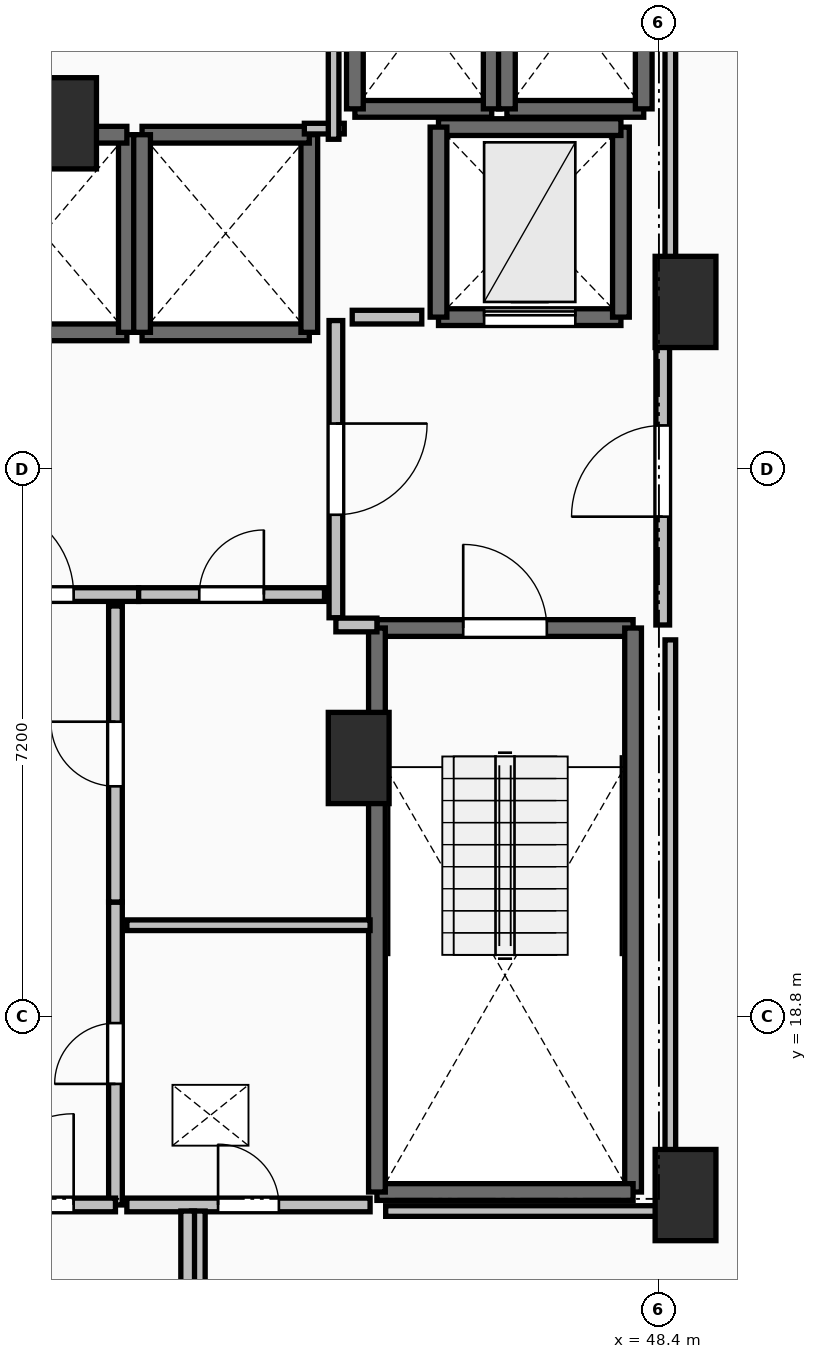
"""IFC4 building model, lengths in metres.
Left out: names, types, materials, properties, quantities, classifications, styles, units other than length and angle.
Written with IfcOpenShell. Run it as: python <this file> out.ifc"""

import sys

from ifc_helpers import new_model, si_unit, direction, frame, frame_2d, origin, origin_2d, place, context, subcontext, project, spatial, rectangle, extrude, element, fill, save


model = new_model("IFC4")
c1 = context("Model", 3, precision=1e-05, world=origin(), true_north=direction((0.0, 1.0)))
c2 = subcontext(c1, "Body", "Model", "MODEL_VIEW")
j1 = project(units=[si_unit("LENGTHUNIT", "METRE"), si_unit("PLANEANGLEUNIT", "RADIAN")], contexts=[c1])
p1 = place(None, origin())
s1 = spatial("IfcSite", under=j1, at=p1, CompositionType="ELEMENT")
p2 = place(p1, origin())
s2 = spatial("IfcBuilding", under=s1, at=p2, CompositionType="ELEMENT")
p3 = place(p2, frame((0.0, 0.0, 78.8)))
s3 = spatial("IfcBuildingStorey", under=s2, at=p3, CompositionType="ELEMENT", Elevation=78.8)
for number, where, z_axis, x_axis in (
    (1, (48.75, 28.2, 0.0), (0.0, 0.0, 1.0), (1.0, 0.0, 0.0)),
    (2, (48.75, 16.45, 0.0), (0.0, 0.0, 1.0), (1.0, 0.0, 0.0)),
    (3, (44.45, 22.2, 0.0), (0.0, 0.0, 1.0), (1.0, 0.0, 0.0)),
    (4, (40.6, 30.55, 0.0), (0.0, 0.0, 1.0), (1.0, 0.0, 0.0)),
):
    element("IfcColumn", number, at=place(p3, frame(where, z_axis=z_axis, x_axis=x_axis)), inside=s3, PredefinedType="PILASTER", context=c2, shape_type="SweptSolid", body=[
        extrude(rectangle(XDim=0.8, YDim=1.2, at=origin_2d()), origin(), (0.0, 0.0, 1.0), 3.5),
    ])
p4 = place(p3, frame((44.69, 23.91, 0.0), z_axis=(0.0, 0.0, 1.0), x_axis=(1.0, 0.0, 0.0)))
e5 = element("IfcWall", 5, at=p4, inside=s3, PredefinedType="SOLIDWALL", context=c2, shape_type="SweptSolid", body=[
    extrude(rectangle(XDim=3.37, YDim=0.22, at=frame_2d((1.685, 0.0))), origin(), (0.0, 0.0, 1.0), 3.24),
])
p5 = place(p4, frame((1.135, 0.0, 0.0)))
e6 = element("IfcOpeningElement", 6, at=p5, cuts=e5, PredefinedType="OPENING", context=c2, shape_type="SweptSolid", body=[
    extrude(rectangle(XDim=1.1, YDim=2.15, at=frame_2d((0.55, 1.075))), frame((0.0, 0.125, 0.0), z_axis=(0.0, -1.0, 0.0), x_axis=(1.0, 0.0, 0.0)), (0.0, 0.0, 1.0), 0.25),
])
p6 = place(p3, frame((48.06, 23.91, 0.0), z_axis=(0.0, 0.0, 1.0), x_axis=(0.0, -1.0, 0.0)))
e7 = element("IfcWall", 7, at=p6, inside=s3, PredefinedType="SOLIDWALL", context=c2, shape_type="SweptSolid", body=[
    extrude(rectangle(XDim=7.42, YDim=0.22, at=frame_2d((3.71, 0.0))), origin(), (0.0, 0.0, 1.0), 3.24),
])
p7 = place(p3, frame((48.06, 16.49, 0.0), z_axis=(0.0, 0.0, 1.0), x_axis=(-1.0, 0.0, 0.0)))
e8 = element("IfcWall", 8, at=p7, inside=s3, PredefinedType="SOLIDWALL", context=c2, shape_type="SweptSolid", body=[
    extrude(rectangle(XDim=3.37, YDim=0.22, at=frame_2d((1.685, 0.0))), origin(), (0.0, 0.0, 1.0), 3.24),
])
p8 = place(p3, frame((44.69, 16.49, 0.0), z_axis=(0.0, 0.0, 1.0), x_axis=(0.0, 1.0, 0.0)))
e9 = element("IfcWall", 9, at=p8, inside=s3, PredefinedType="SOLIDWALL", context=c2, shape_type="SweptSolid", body=[
    extrude(rectangle(XDim=7.42, YDim=0.22, at=frame_2d((3.71, 0.0))), origin(), (0.0, 0.0, 1.0), 3.24),
])
p9 = place(p3, frame((39.2, 27.8, 0.0), z_axis=(0.0, 0.0, 1.0), x_axis=(1.0, 0.0, 0.0)))
e10 = element("IfcWall", 10, at=p9, inside=s3, PredefinedType="SOLIDWALL", context=c2, shape_type="SweptSolid", body=[
    extrude(rectangle(XDim=2.2, YDim=0.22, at=frame_2d((1.1, 0.0))), origin(), (0.0, 0.0, 1.0), 3.24),
])
p10 = place(p3, frame((41.4, 27.8, 0.0), z_axis=(0.0, 0.0, 1.0), x_axis=(0.0, 1.0, 0.0)))
e11 = element("IfcWall", 11, at=p10, inside=s3, PredefinedType="SOLIDWALL", context=c2, shape_type="SweptSolid", body=[
    extrude(rectangle(XDim=2.6, YDim=0.22, at=frame_2d((1.3, 0.0))), origin(), (0.0, 0.0, 1.0), 3.24),
])
for number, where, z_axis, x_axis in (
    (12, (41.4, 30.4, 0.0), (0.0, 0.0, 1.0), (-1.0, 0.0, 0.0)),
    (13, (41.6, 27.8, 0.0), (0.0, 0.0, 1.0), (1.0, 0.0, 0.0)),
):
    element("IfcWall", number, at=place(p3, frame(where, z_axis=z_axis, x_axis=x_axis)), inside=s3, PredefinedType="SOLIDWALL", context=c2, shape_type="SweptSolid", body=[
        extrude(rectangle(XDim=2.2, YDim=0.22, at=frame_2d((1.1, 0.0))), origin(), (0.0, 0.0, 1.0), 3.24),
    ])
p11 = place(p3, frame((43.8, 27.8, 0.0), z_axis=(0.0, 0.0, 1.0), x_axis=(0.0, 1.0, 0.0)))
e14 = element("IfcWall", 14, at=p11, inside=s3, PredefinedType="SOLIDWALL", context=c2, shape_type="SweptSolid", body=[
    extrude(rectangle(XDim=2.6, YDim=0.22, at=frame_2d((1.3, 0.0))), origin(), (0.0, 0.0, 1.0), 3.24),
])
p12 = place(p3, frame((43.8, 30.4, 0.0), z_axis=(0.0, 0.0, 1.0), x_axis=(-1.0, 0.0, 0.0)))
e15 = element("IfcWall", 15, at=p12, inside=s3, PredefinedType="SOLIDWALL", context=c2, shape_type="SweptSolid", body=[
    extrude(rectangle(XDim=2.2, YDim=0.22, at=frame_2d((1.1, 0.0))), origin(), (0.0, 0.0, 1.0), 3.24),
])
p13 = place(p3, frame((41.6, 30.4, 0.0), z_axis=(0.0, 0.0, 1.0), x_axis=(0.0, -1.0, 0.0)))
e16 = element("IfcWall", 16, at=p13, inside=s3, PredefinedType="SOLIDWALL", context=c2, shape_type="SweptSolid", body=[
    extrude(rectangle(XDim=2.6, YDim=0.22, at=frame_2d((1.3, 0.0))), origin(), (0.0, 0.0, 1.0), 3.24),
])
p14 = place(p3, frame((44.4, 30.74, 0.0), z_axis=(0.0, 0.0, 1.0), x_axis=(1.0, 0.0, 0.0)))
e17 = element("IfcWall", 17, at=p14, inside=s3, PredefinedType="SOLIDWALL", context=c2, shape_type="SweptSolid", body=[
    extrude(rectangle(XDim=1.8, YDim=0.22, at=frame_2d((0.9, 0.0))), origin(), (0.0, 0.0, 1.0), 3.24),
])
for number, where, z_axis, x_axis in (
    (18, (46.2, 30.74, 0.0), (0.0, 0.0, 1.0), (0.0, 1.0, 0.0)),
    (19, (44.4, 33.16, 0.0), (0.0, 0.0, 1.0), (0.0, -1.0, 0.0)),
):
    element("IfcWall", number, at=place(p3, frame(where, z_axis=z_axis, x_axis=x_axis)), inside=s3, PredefinedType="SOLIDWALL", context=c2, shape_type="SweptSolid", body=[
        extrude(rectangle(XDim=2.42, YDim=0.22, at=frame_2d((1.21, 0.0))), origin(), (0.0, 0.0, 1.0), 3.24),
    ])
p15 = place(p3, frame((46.4, 30.74, 0.0), z_axis=(0.0, 0.0, 1.0), x_axis=(1.0, 0.0, 0.0)))
e20 = element("IfcWall", 20, at=p15, inside=s3, PredefinedType="SOLIDWALL", context=c2, shape_type="SweptSolid", body=[
    extrude(rectangle(XDim=1.8, YDim=0.22, at=frame_2d((0.9, 0.0))), origin(), (0.0, 0.0, 1.0), 3.24),
])
for number, where, z_axis, x_axis in (
    (21, (48.2, 30.74, 0.0), (0.0, 0.0, 1.0), (0.0, 1.0, 0.0)),
    (22, (46.4, 33.16, 0.0), (0.0, 0.0, 1.0), (0.0, -1.0, 0.0)),
):
    element("IfcWall", number, at=place(p3, frame(where, z_axis=z_axis, x_axis=x_axis)), inside=s3, PredefinedType="SOLIDWALL", context=c2, shape_type="SweptSolid", body=[
        extrude(rectangle(XDim=2.42, YDim=0.22, at=frame_2d((1.21, 0.0))), origin(), (0.0, 0.0, 1.0), 3.24),
    ])
p16 = place(p3, frame((45.5, 28.0, 0.0), z_axis=(0.0, 0.0, 1.0), x_axis=(1.0, 0.0, 0.0)))
e23 = element("IfcWall", 23, at=p16, inside=s3, PredefinedType="SHEAR", context=c2, shape_type="SweptSolid", body=[
    extrude(rectangle(XDim=2.4, YDim=0.22, at=frame_2d((1.2, 0.0))), origin(), (0.0, 0.0, 1.0), 3.24),
])
p17 = place(p16, frame((0.6, 0.0, 0.0)))
e24 = element("IfcOpeningElement", 24, at=p17, cuts=e23, PredefinedType="OPENING", context=c2, shape_type="SweptSolid", body=[
    extrude(rectangle(XDim=1.2, YDim=2.2, at=frame_2d((0.6, 1.1))), frame((0.0, 0.125, 0.0), z_axis=(0.0, -1.0, 0.0), x_axis=(1.0, 0.0, 0.0)), (0.0, 0.0, 1.0), 0.25),
])
p18 = place(p3, frame((47.9, 28.0, 0.0), z_axis=(0.0, 0.0, 1.0), x_axis=(0.0, 1.0, 0.0)))
e25 = element("IfcWall", 25, at=p18, inside=s3, PredefinedType="SHEAR", context=c2, shape_type="SweptSolid", body=[
    extrude(rectangle(XDim=2.5, YDim=0.22, at=frame_2d((1.25, 0.0))), origin(), (0.0, 0.0, 1.0), 3.24),
])
p19 = place(p3, frame((47.9, 30.5, 0.0), z_axis=(0.0, 0.0, 1.0), x_axis=(-1.0, 0.0, 0.0)))
e26 = element("IfcWall", 26, at=p19, inside=s3, PredefinedType="SHEAR", context=c2, shape_type="SweptSolid", body=[
    extrude(rectangle(XDim=2.4, YDim=0.22, at=frame_2d((1.2, 0.0))), origin(), (0.0, 0.0, 1.0), 3.24),
])
p20 = place(p3, frame((45.5, 30.5, 0.0), z_axis=(0.0, 0.0, 1.0), x_axis=(0.0, -1.0, 0.0)))
e27 = element("IfcWall", 27, at=p20, inside=s3, PredefinedType="SHEAR", context=c2, shape_type="SweptSolid", body=[
    extrude(rectangle(XDim=2.5, YDim=0.22, at=frame_2d((1.25, 0.0))), origin(), (0.0, 0.0, 1.0), 3.24),
])
p21 = place(p3, frame((44.15, 27.955, 0.0), z_axis=(0.0, 0.0, 1.0), x_axis=(0.0, -1.0, 0.0)))
e28 = element("IfcWall", 28, at=p21, inside=s3, PredefinedType="PARTITIONING", context=c2, shape_type="SweptSolid", body=[
    extrude(rectangle(XDim=3.91, YDim=0.18, at=frame_2d((1.955, 0.0))), origin(), (0.0, 0.0, 1.0), 3.24),
])
p22 = place(p21, frame((1.355, 0.0, 0.0)))
e29 = element("IfcOpeningElement", 29, at=p22, cuts=e28, PredefinedType="OPENING", context=c2, shape_type="SweptSolid", body=[
    extrude(rectangle(XDim=1.2, YDim=2.15, at=frame_2d((0.6, 1.075))), frame((0.0, 0.105, 0.0), z_axis=(0.0, -1.0, 0.0), x_axis=(1.0, 0.0, 0.0)), (0.0, 0.0, 1.0), 0.21),
])
p23 = place(p3, frame((44.15, 23.95, 0.0), z_axis=(0.0, 0.0, 1.0), x_axis=(1.0, 0.0, 0.0)))
e30 = element("IfcWall", 30, at=p23, inside=s3, PredefinedType="PARTITIONING", context=c2, shape_type="SweptSolid", body=[
    extrude(rectangle(XDim=0.54, YDim=0.18, at=frame_2d((0.27, 0.0))), origin(), (0.0, 0.0, 1.0), 3.24),
])
p24 = place(p3, frame((48.45, 23.95, 0.0), z_axis=(0.0, 0.0, 1.0), x_axis=(0.0, 1.0, 0.0)))
e31 = element("IfcWall", 31, at=p24, inside=s3, PredefinedType="PARTITIONING", context=c2, shape_type="SweptSolid", body=[
    extrude(rectangle(XDim=4.05, YDim=0.18, at=frame_2d((2.025, 0.0))), origin(), (0.0, 0.0, 1.0), 3.24),
])
p25 = place(p24, frame((1.425, 0.0, 0.0)))
e32 = element("IfcOpeningElement", 32, at=p25, cuts=e31, PredefinedType="OPENING", context=c2, shape_type="SweptSolid", body=[
    extrude(rectangle(XDim=1.2, YDim=2.15, at=frame_2d((0.6, 1.075))), frame((0.0, 0.105, 0.0), z_axis=(0.0, -1.0, 0.0), x_axis=(1.0, 0.0, 0.0)), (0.0, 0.0, 1.0), 0.21),
])
p26 = place(p3, frame((38.645, 24.35, 0.0), z_axis=(0.0, 0.0, 1.0), x_axis=(1.0, 0.0, 0.0)))
e33 = element("IfcWall", 33, at=p26, inside=s3, PredefinedType="PARTITIONING", context=c2, shape_type="SweptSolid", body=[
    extrude(rectangle(XDim=2.91, YDim=0.18, at=frame_2d((1.455, 0.0))), origin(), (0.0, 0.0, 1.0), 3.24),
])
p27 = place(p26, frame((0.855, 0.0, 0.0)))
e34 = element("IfcOpeningElement", 34, at=p27, cuts=e33, PredefinedType="OPENING", context=c2, shape_type="SweptSolid", body=[
    extrude(rectangle(XDim=1.2, YDim=2.15, at=frame_2d((0.6, 1.075))), frame((0.0, 0.105, 0.0), z_axis=(0.0, -1.0, 0.0), x_axis=(1.0, 0.0, 0.0)), (0.0, 0.0, 1.0), 0.21),
])
p28 = place(p3, frame((41.555, 24.35, 0.0), z_axis=(0.0, 0.0, 1.0), x_axis=(1.0, 0.0, 0.0)))
e35 = element("IfcWall", 35, at=p28, inside=s3, PredefinedType="PARTITIONING", context=c2, shape_type="SweptSolid", body=[
    extrude(rectangle(XDim=2.445, YDim=0.18, at=frame_2d((1.223, 0.0))), origin(), (0.0, 0.0, 1.0), 3.24),
])
p29 = place(p28, frame((0.798, 0.0, 0.0)))
e36 = element("IfcOpeningElement", 36, at=p29, cuts=e35, PredefinedType="OPENING", context=c2, shape_type="SweptSolid", body=[
    extrude(rectangle(XDim=0.85, YDim=2.1, at=frame_2d((0.425, 1.05))), frame((0.0, 0.105, 0.0), z_axis=(0.0, -1.0, 0.0), x_axis=(1.0, 0.0, 0.0)), (0.0, 0.0, 1.0), 0.21),
])
p30 = place(p3, frame((41.25, 16.32, 0.0), z_axis=(0.0, 0.0, 1.0), x_axis=(0.0, 1.0, 0.0)))
e37 = element("IfcWall", 37, at=p30, inside=s3, PredefinedType="PARTITIONING", context=c2, shape_type="SweptSolid", body=[
    extrude(rectangle(XDim=3.985, YDim=0.18, at=frame_2d((1.992, 0.0))), origin(), (0.0, 0.0, 1.0), 3.24),
])
p31 = place(p30, frame((1.593, 0.0, 0.0)))
e38 = element("IfcOpeningElement", 38, at=p31, cuts=e37, PredefinedType="OPENING", context=c2, shape_type="SweptSolid", body=[
    extrude(rectangle(XDim=0.8, YDim=2.05, at=frame_2d((0.4, 1.025))), frame((0.0, 0.105, 0.0), z_axis=(0.0, -1.0, 0.0), x_axis=(1.0, 0.0, 0.0)), (0.0, 0.0, 1.0), 0.21),
])
p32 = place(p3, frame((41.25, 20.305, 0.0), z_axis=(0.0, 0.0, 1.0), x_axis=(0.0, 1.0, 0.0)))
e39 = element("IfcWall", 39, at=p32, inside=s3, PredefinedType="PARTITIONING", context=c2, shape_type="SweptSolid", body=[
    extrude(rectangle(XDim=3.895, YDim=0.18, at=frame_2d((1.948, 0.0))), origin(), (0.0, 0.0, 1.0), 3.24),
])
p33 = place(p32, frame((1.522, 0.0, 0.0)))
e40 = element("IfcOpeningElement", 40, at=p33, cuts=e39, PredefinedType="OPENING", context=c2, shape_type="SweptSolid", body=[
    extrude(rectangle(XDim=0.85, YDim=2.1, at=frame_2d((0.425, 1.05))), frame((0.0, 0.105, 0.0), z_axis=(0.0, -1.0, 0.0), x_axis=(1.0, 0.0, 0.0)), (0.0, 0.0, 1.0), 0.21),
])
p34 = place(p3, frame((38.95, 16.32, 0.0), z_axis=(0.0, 0.0, 1.0), x_axis=(1.0, 0.0, 0.0)))
e41 = element("IfcWall", 41, at=p34, inside=s3, PredefinedType="PARTITIONING", context=c2, shape_type="SweptSolid", body=[
    extrude(rectangle(XDim=2.3, YDim=0.18, at=frame_2d((1.15, 0.0))), origin(), (0.0, 0.0, 1.0), 3.24),
])
p35 = place(p34, frame((0.55, 0.0, 0.0)))
e42 = element("IfcOpeningElement", 42, at=p35, cuts=e41, PredefinedType="OPENING", context=c2, shape_type="SweptSolid", body=[
    extrude(rectangle(XDim=1.2, YDim=2.15, at=frame_2d((0.6, 1.075))), frame((0.0, 0.105, 0.0), z_axis=(0.0, -1.0, 0.0), x_axis=(1.0, 0.0, 0.0)), (0.0, 0.0, 1.0), 0.21),
])
p36 = place(p3, frame((44.6, 20.0, 0.0), z_axis=(0.0, 0.0, 1.0), x_axis=(-1.0, 0.0, 0.0)))
e43 = element("IfcWall", 43, at=p36, inside=s3, PredefinedType="PARTITIONING", context=c2, shape_type="SweptSolid", body=[
    extrude(rectangle(XDim=3.2, YDim=0.14, at=frame_2d((1.6, 0.0))), origin(), (0.0, 0.0, 1.0), 3.24),
])
p37 = place(p3, frame((41.4, 16.32, 0.0), z_axis=(0.0, 0.0, 1.0), x_axis=(1.0, 0.0, 0.0)))
e44 = element("IfcWall", 44, at=p37, inside=s3, PredefinedType="PARTITIONING", context=c2, shape_type="SweptSolid", body=[
    extrude(rectangle(XDim=3.2, YDim=0.18, at=frame_2d((1.6, 0.0))), origin(), (0.0, 0.0, 1.0), 3.24),
])
p38 = place(p37, frame((1.2, 0.0, 0.0)))
e45 = element("IfcOpeningElement", 45, at=p38, cuts=e44, PredefinedType="OPENING", context=c2, shape_type="SweptSolid", body=[
    extrude(rectangle(XDim=0.8, YDim=2.05, at=frame_2d((0.4, 1.025))), frame((0.0, 0.105, 0.0), z_axis=(0.0, -1.0, 0.0), x_axis=(1.0, 0.0, 0.0)), (0.0, 0.0, 1.0), 0.21),
])
for number, where, z_axis, x_axis in (
    (46, (42.34, 16.24, 0.0), (0.0, 0.0, 1.0), (0.0, -1.0, 0.0)),
    (47, (42.2, 14.1, 0.0), (0.0, 0.0, 1.0), (0.0, 1.0, 0.0)),
):
    element("IfcWall", number, at=place(p3, frame(where, z_axis=z_axis, x_axis=x_axis)), inside=s3, PredefinedType="PARTITIONING", context=c2, shape_type="SweptSolid", body=[
        extrude(rectangle(XDim=2.14, YDim=0.18, at=frame_2d((1.07, 0.0))), origin(), (0.0, 0.0, 1.0), 2.922),
    ])
p39 = place(p3, frame((45.28, 28.0, 0.0), z_axis=(0.0, 0.0, 1.0), x_axis=(-1.0, 0.0, 0.0)))
e48 = element("IfcWall", 48, at=p39, inside=s3, PredefinedType="PARTITIONING", context=c2, shape_type="SweptSolid", body=[
    extrude(rectangle(XDim=0.915, YDim=0.18, at=frame_2d((0.458, 0.0))), origin(), (0.0, 0.0, 1.0), 3.24),
])
p40 = place(p3, frame((43.735, 30.48, 0.0), z_axis=(0.0, 0.0, 1.0), x_axis=(1.0, 0.0, 0.0)))
e49 = element("IfcWall", 49, at=p40, inside=s3, PredefinedType="PARTITIONING", context=c2, shape_type="SweptSolid", body=[
    extrude(rectangle(XDim=0.525, YDim=0.14, at=frame_2d((0.262, 0.0))), origin(), (0.0, 0.0, 1.0), 3.24),
])
p41 = place(p3, frame((44.12, 30.34, 0.0), z_axis=(0.0, 0.0, 1.0), x_axis=(0.0, 1.0, 0.0)))
e50 = element("IfcWall", 50, at=p41, inside=s3, PredefinedType="PARTITIONING", context=c2, shape_type="SweptSolid", body=[
    extrude(rectangle(XDim=2.66, YDim=0.14, at=frame_2d((1.33, 0.0))), origin(), (0.0, 0.0, 1.0), 3.24),
])
p42 = place(p3, frame((48.55, 33.45, 0.0), z_axis=(0.0, 0.0, 1.0), x_axis=(0.0, -1.0, 0.0)))
e51 = element("IfcWall", 51, at=p42, inside=s3, PredefinedType="PARTITIONING", context=c2, shape_type="SweptSolid", body=[
    extrude(rectangle(XDim=5.254, YDim=0.14, at=frame_2d((2.627, 0.0))), origin(), (0.0, 0.0, 1.0), 2.432),
])
p43 = place(p3, frame((48.55, 23.754, 0.0), z_axis=(0.0, 0.0, 1.0), x_axis=(0.0, -1.0, 0.0)))
e52 = element("IfcWall", 52, at=p43, inside=s3, PredefinedType="PARTITIONING", context=c2, shape_type="SweptSolid", body=[
    extrude(rectangle(XDim=7.514, YDim=0.14, at=frame_2d((3.757, 0.0))), origin(), (0.0, 0.0, 1.0), 2.432),
])
p44 = place(p3, frame((48.55, 16.24, 0.0), z_axis=(0.0, 0.0, 1.0), x_axis=(-1.0, 0.0, 0.0)))
e53 = element("IfcWall", 53, at=p44, inside=s3, PredefinedType="PARTITIONING", context=c2, shape_type="SweptSolid", body=[
    extrude(rectangle(XDim=3.745, YDim=0.14, at=frame_2d((1.873, 0.0))), origin(), (0.0, 0.0, 1.0), 2.432),
])
p45 = place(p5, origin())
e54 = element("IfcDoor", 54, at=p45, inside=s3, OperationType="SINGLE_SWING_LEFT", PredefinedType="DOOR", context=c2, shape_type="SweptSolid", body=[
    extrude(rectangle(XDim=1.1, YDim=2.15, at=frame_2d((0.55, 1.075))), frame((0.0, 0.025, 0.0), z_axis=(0.0, -1.0, 0.0), x_axis=(1.0, 0.0, 0.0)), (0.0, 0.0, 1.0), 0.05),
])
fill(e6, e54)
p46 = place(p17, origin())
e55 = element("IfcDoor", 55, at=p46, inside=s3, OperationType="SLIDING_TO_LEFT", PredefinedType="DOOR", context=c2, shape_type="SweptSolid", body=[
    extrude(rectangle(XDim=1.2, YDim=2.2, at=frame_2d((0.6, 1.1))), frame((0.0, 0.025, 0.0), z_axis=(0.0, -1.0, 0.0), x_axis=(1.0, 0.0, 0.0)), (0.0, 0.0, 1.0), 0.05),
])
fill(e24, e55)
p47 = place(p22, origin())
e56 = element("IfcDoor", 56, at=p47, inside=s3, OperationType="SINGLE_SWING_LEFT", PredefinedType="DOOR", context=c2, shape_type="SweptSolid", body=[
    extrude(rectangle(XDim=1.2, YDim=2.15, at=frame_2d((0.6, 1.075))), frame((0.0, 0.025, 0.0), z_axis=(0.0, -1.0, 0.0), x_axis=(1.0, 0.0, 0.0)), (0.0, 0.0, 1.0), 0.05),
])
fill(e29, e56)
p48 = place(p25, origin())
e57 = element("IfcDoor", 57, at=p48, inside=s3, OperationType="SINGLE_SWING_LEFT", PredefinedType="DOOR", context=c2, shape_type="SweptSolid", body=[
    extrude(rectangle(XDim=1.2, YDim=2.15, at=frame_2d((0.6, 1.075))), frame((0.0, 0.025, 0.0), z_axis=(0.0, -1.0, 0.0), x_axis=(1.0, 0.0, 0.0)), (0.0, 0.0, 1.0), 0.05),
])
fill(e32, e57)
p49 = place(p27, origin())
e58 = element("IfcDoor", 58, at=p49, inside=s3, OperationType="SINGLE_SWING_LEFT", PredefinedType="DOOR", context=c2, shape_type="SweptSolid", body=[
    extrude(rectangle(XDim=1.2, YDim=2.15, at=frame_2d((0.6, 1.075))), frame((0.0, 0.025, 0.0), z_axis=(0.0, -1.0, 0.0), x_axis=(1.0, 0.0, 0.0)), (0.0, 0.0, 1.0), 0.05),
])
fill(e34, e58)
p50 = place(p29, origin())
e59 = element("IfcDoor", 59, at=p50, inside=s3, OperationType="SINGLE_SWING_RIGHT", PredefinedType="DOOR", context=c2, shape_type="SweptSolid", body=[
    extrude(rectangle(XDim=0.85, YDim=2.1, at=frame_2d((0.425, 1.05))), frame((0.0, 0.025, 0.0), z_axis=(0.0, -1.0, 0.0), x_axis=(1.0, 0.0, 0.0)), (0.0, 0.0, 1.0), 0.05),
])
fill(e36, e59)
p51 = place(p31, origin())
e60 = element("IfcDoor", 60, at=p51, inside=s3, OperationType="SINGLE_SWING_LEFT", PredefinedType="DOOR", context=c2, shape_type="SweptSolid", body=[
    extrude(rectangle(XDim=0.8, YDim=2.05, at=frame_2d((0.4, 1.025))), frame((0.0, 0.025, 0.0), z_axis=(0.0, -1.0, 0.0), x_axis=(1.0, 0.0, 0.0)), (0.0, 0.0, 1.0), 0.05),
])
fill(e38, e60)
p52 = place(p33, origin())
e61 = element("IfcDoor", 61, at=p52, inside=s3, OperationType="SINGLE_SWING_RIGHT", PredefinedType="DOOR", context=c2, shape_type="SweptSolid", body=[
    extrude(rectangle(XDim=0.85, YDim=2.1, at=frame_2d((0.425, 1.05))), frame((0.0, 0.025, 0.0), z_axis=(0.0, -1.0, 0.0), x_axis=(1.0, 0.0, 0.0)), (0.0, 0.0, 1.0), 0.05),
])
fill(e40, e61)
p53 = place(p35, origin())
e62 = element("IfcDoor", 62, at=p53, inside=s3, OperationType="SINGLE_SWING_RIGHT", PredefinedType="DOOR", context=c2, shape_type="SweptSolid", body=[
    extrude(rectangle(XDim=1.2, YDim=2.15, at=frame_2d((0.6, 1.075))), frame((0.0, 0.025, 0.0), z_axis=(0.0, -1.0, 0.0), x_axis=(1.0, 0.0, 0.0)), (0.0, 0.0, 1.0), 0.05),
])
fill(e42, e62)
p54 = place(p38, origin())
e63 = element("IfcDoor", 63, at=p54, inside=s3, OperationType="SINGLE_SWING_LEFT", PredefinedType="DOOR", context=c2, shape_type="SweptSolid", body=[
    extrude(rectangle(XDim=0.8, YDim=2.05, at=frame_2d((0.4, 1.025))), frame((0.0, 0.025, 0.0), z_axis=(0.0, -1.0, 0.0), x_axis=(1.0, 0.0, 0.0)), (0.0, 0.0, 1.0), 0.05),
])
fill(e45, e63)
save(model, sys.argv[1])
